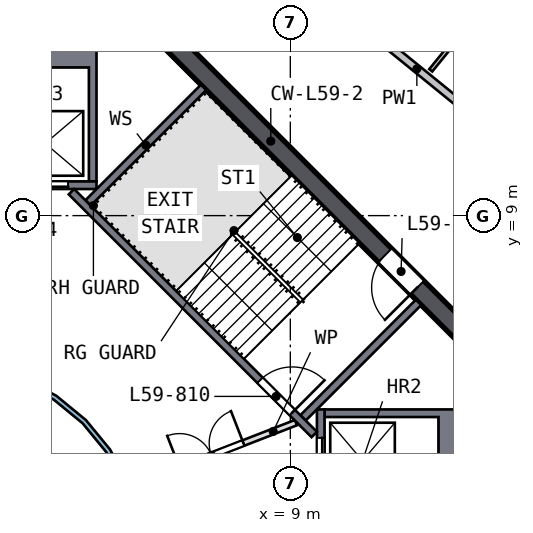
"""IFC4 building model, lengths in metres.
Left out: names, types, materials, properties, quantities, classifications, styles, units other than length and angle.
Written with IfcOpenShell. Run it as: python <this file> out.ifc"""

import sys

from ifc_helpers import new_model, si_unit, direction, frame, frame_2d, origin, place, context, subcontext, project, spatial, polyline, rectangle, outline, extrude, element, fill, save


model = new_model("IFC4")
c1 = context("Model", 3, precision=1e-05, world=origin(), true_north=direction((0.0, 1.0)))
c2 = subcontext(c1, "Body", "Model", "MODEL_VIEW")
j1 = project(units=[si_unit("LENGTHUNIT", "METRE"), si_unit("PLANEANGLEUNIT", "RADIAN")], contexts=[c1])
p1 = place(None, origin())
s1 = spatial("IfcSite", under=j1, at=p1, CompositionType="ELEMENT")
p2 = place(p1, origin())
s2 = spatial("IfcBuilding", under=s1, at=p2, CompositionType="ELEMENT")
p3 = place(p2, frame((0.0, 0.0, 241.0)))
s3 = spatial("IfcBuildingStorey", under=s2, at=p3, CompositionType="ELEMENT", Elevation=241.0)
p4 = place(p3, frame((13.823, 5.622, 0.0), z_axis=(0.0, 0.0, 1.0), x_axis=(-0.707106781, 0.707106781, 0.0)))
e1 = element("IfcWall", 1, at=p4, inside=s3, PredefinedType="SHEAR", context=c2, shape_type="SweptSolid", body=[
    extrude(rectangle(XDim=11.598, YDim=0.5, at=frame_2d((5.799, 0.0))), origin(), (0.0, 0.0, 1.0), 3.5),
])
p5 = place(p4, frame((2.099, 0.0, 0.0)))
e2 = element("IfcOpeningElement", 2, at=p5, cuts=e1, PredefinedType="OPENING", context=c2, shape_type="SweptSolid", body=[
    extrude(rectangle(XDim=1.2, YDim=2.1, at=frame_2d((0.6, 1.05))), frame((0.0, 0.26, 0.0), z_axis=(0.0, -1.0, 0.0), x_axis=(1.0, 0.0, 0.0)), (0.0, 0.0, 1.0), 0.52),
])
p6 = place(p3, origin())
e3 = element("IfcWall", 3, at=p6, inside=s3, PredefinedType="SOLIDWALL", context=c2, shape_type="SweptSolid", body=[
    extrude(outline(polyline([(13.5, 3.9), (13.5, 1.2), (9.9, 1.2), (9.9, 1.4), (12.9, 1.4), (12.9, 3.7), (9.9, 3.7), (9.9, 3.9), (13.5, 3.9)])), origin(), (0.0, 0.0, 1.0), 3.19),
])
p7 = place(p3, frame((9.8, 1.2, 0.0), z_axis=(0.0, 0.0, 1.0), x_axis=(0.0, 1.0, 0.0)))
e4 = element("IfcWall", 4, at=p7, inside=s3, PredefinedType="SOLIDWALL", context=c2, shape_type="SweptSolid", body=[
    extrude(rectangle(XDim=2.7, YDim=0.2, at=frame_2d((1.35, 0.0))), origin(), (0.0, 0.0, 1.0), 3.19),
])
p8 = place(p7, frame((0.75, 0.0, 0.0)))
e5 = element("IfcOpeningElement", 5, at=p8, cuts=e4, PredefinedType="OPENING", context=c2, shape_type="SweptSolid", body=[
    extrude(rectangle(XDim=1.2, YDim=2.1, at=frame_2d((0.6, 1.05))), frame((0.0, 0.11, 0.0), z_axis=(0.0, -1.0, 0.0), x_axis=(1.0, 0.0, 0.0)), (0.0, 0.0, 1.0), 0.22),
])
p9 = place(p3, origin())
e6 = element("IfcWall", 6, at=p9, inside=s3, PredefinedType="SOLIDWALL", context=c2, shape_type="SweptSolid", body=[
    extrude(outline(polyline([(3.9, 9.9), (3.7, 9.9), (3.7, 12.9), (1.4, 12.9), (1.4, 9.9), (1.2, 9.9), (1.2, 13.5), (3.9, 13.5), (3.9, 9.9)])), origin(), (0.0, 0.0, 1.0), 3.19),
])
p10 = place(p3, frame((1.2, 9.8, 0.0), z_axis=(0.0, 0.0, 1.0), x_axis=(1.0, 0.0, 0.0)))
e7 = element("IfcWall", 7, at=p10, inside=s3, PredefinedType="SOLIDWALL", context=c2, shape_type="SweptSolid", body=[
    extrude(rectangle(XDim=2.7, YDim=0.2, at=frame_2d((1.35, 0.0))), origin(), (0.0, 0.0, 1.0), 3.19),
])
p11 = place(p10, frame((0.75, 0.0, 0.0)))
e8 = element("IfcOpeningElement", 8, at=p11, cuts=e7, PredefinedType="OPENING", context=c2, shape_type="SweptSolid", body=[
    extrude(rectangle(XDim=1.2, YDim=2.1, at=frame_2d((0.6, 1.05))), frame((0.0, 0.11, 0.0), z_axis=(0.0, -1.0, 0.0), x_axis=(1.0, 0.0, 0.0)), (0.0, 0.0, 1.0), 0.22),
])
p12 = place(p3, frame((3.24, 9.629, 0.0), z_axis=(0.0, 0.0, 1.0), x_axis=(0.707106781, -0.707106781, 0.0)))
e9 = element("IfcWall", 9, at=p12, inside=s3, PredefinedType="SOLIDWALL", context=c2, shape_type="SweptSolid", body=[
    extrude(rectangle(XDim=9.036, YDim=0.2, at=frame_2d((4.518, 0.0))), origin(), (0.0, 0.0, 1.0), 3.19),
])
p13 = place(p12, frame((7.018, 0.0, 0.0)))
e10 = element("IfcOpeningElement", 10, at=p13, cuts=e9, PredefinedType="OPENING", context=c2, shape_type="SweptSolid", body=[
    extrude(rectangle(XDim=1.2, YDim=2.1, at=frame_2d((0.6, 1.05))), frame((0.0, 0.11, 0.0), z_axis=(0.0, -1.0, 0.0), x_axis=(1.0, 0.0, 0.0)), (0.0, 0.0, 1.0), 0.22),
])
for number, where, z_axis, x_axis in (
    (11, (9.334, 3.677, 0.0), (0.0, 0.0, 1.0), (0.707, 0.707, 0.0)),
    (12, (3.677, 9.334, 0.0), (0.0, 0.0, 1.0), (0.707, 0.707, 0.0)),
):
    element("IfcWall", number, at=place(p3, frame(where, z_axis=z_axis, x_axis=x_axis)), inside=s3, PredefinedType="SOLIDWALL", context=c2, shape_type="SweptSolid", body=[
        extrude(rectangle(XDim=4.3, YDim=0.2, at=frame_2d((2.15, 0.0))), origin(), (0.0, 0.0, 1.0), 3.19),
    ])
p14 = place(p3, frame((4.782, 1.857, 0.0), z_axis=(0.0, 0.0, 1.0), x_axis=(0.932155279, 0.362058746, 0.0)))
e13 = element("IfcWall", 13, at=p14, inside=s3, PredefinedType="PARTITIONING", context=c2, shape_type="SweptSolid", body=[
    extrude(rectangle(XDim=4.682, YDim=0.15, at=frame_2d((2.341, 0.0))), origin(), (0.0, 0.0, 1.0), 3.19),
])
p15 = place(p14, frame((1.4, 0.0, 0.0)))
e14 = element("IfcOpeningElement", 14, at=p15, cuts=e13, PredefinedType="OPENING", context=c2, shape_type="SweptSolid", body=[
    extrude(rectangle(XDim=1.8, YDim=2.1, at=frame_2d((0.9, 1.05))), frame((0.0, 0.085, 0.0), z_axis=(0.0, -1.0, 0.0), x_axis=(1.0, 0.0, 0.0)), (0.0, 0.0, 1.0), 0.17),
])
p16 = place(p3, origin())
e15 = element("IfcWall", 15, at=p16, inside=s3, PredefinedType="SOLIDWALL", context=c2, shape_type="SweptSolid", body=[
    extrude(outline(polyline([(5.021, -0.999), (4.73, -1.959), (4.257, -2.844), (3.62, -3.62), (2.844, -4.257), (1.959, -4.73), (0.999, -5.021), (0.0, -5.12), (-0.999, -5.021), (-1.959, -4.73), (-2.844, -4.257), (-3.62, -3.62), (-4.257, -2.844), (-4.73, -1.959), (-5.021, -0.999), (-5.12, 0.0), (-5.021, 0.999), (-4.73, 1.959), (-4.257, 2.844), (-3.62, 3.62), (-2.844, 4.257), (-1.959, 4.73), (-0.999, 5.021), (0.0, 5.12), (0.999, 5.021), (1.959, 4.73), (2.844, 4.257), (3.62, 3.62), (4.257, 2.844), (4.73, 1.959), (5.021, 0.999), (5.12, 0.0), (5.021, -0.999)]), holes=[polyline([(4.904, 0.976), (4.619, 1.913), (4.157, 2.778), (3.535, 3.535), (2.778, 4.157), (1.913, 4.619), (0.976, 4.904), (0.0, 5.0), (-0.976, 4.904), (-1.913, 4.619), (-2.778, 4.157), (-3.535, 3.535), (-4.157, 2.778), (-4.619, 1.913), (-4.904, 0.976), (-5.0, 0.0), (-4.904, -0.976), (-4.619, -1.913), (-4.157, -2.778), (-3.535, -3.535), (-2.778, -4.157), (-1.913, -4.619), (-0.976, -4.904), (0.0, -5.0), (0.976, -4.904), (1.913, -4.619), (2.778, -4.157), (3.535, -3.535), (4.157, -2.778), (4.619, -1.913), (4.904, -0.976), (5.0, 0.0), (4.904, 0.976)])]), origin(), (0.0, 0.0, 1.0), 3.19),
])
p17 = place(p3, frame((7.513, 16.78, 0.0), z_axis=(0.0, 0.0, 1.0), x_axis=(0.775830166, -0.630941799, 0.0)))
e16 = element("IfcWall", 16, at=p17, inside=s3, PredefinedType="SOLIDWALL", context=c2, shape_type="SweptSolid", body=[
    extrude(rectangle(XDim=9.316, YDim=0.2, at=frame_2d((4.658, 0.0))), origin(), (0.0, 0.0, 1.0), 3.19),
])
p18 = place(p17, frame((1.9, 0.0, 0.0)))
e17 = element("IfcOpeningElement", 17, at=p18, cuts=e16, PredefinedType="OPENING", context=c2, shape_type="SweptSolid", body=[
    extrude(rectangle(XDim=1.0, YDim=2.1, at=frame_2d((0.5, 1.05))), frame((0.0, 0.11, 0.0), z_axis=(0.0, -1.0, 0.0), x_axis=(1.0, 0.0, 0.0)), (0.0, 0.0, 1.0), 0.22),
])
p19 = place(p3, frame((14.651, 15.228, 0.0), z_axis=(0.0, 0.0, 1.0), x_axis=(-0.630936464, -0.775834504, 0.0)))
e18 = element("IfcWall", 18, at=p19, inside=s3, PredefinedType="PARTITIONING", context=c2, shape_type="SweptSolid", body=[
    extrude(rectangle(XDim=3.1, YDim=0.1, at=frame_2d((1.55, 0.0))), origin(), (0.0, 0.0, 1.0), 3.19),
])
p20 = place(p19, frame((1.15, 0.0, 0.0)))
e19 = element("IfcOpeningElement", 19, at=p20, cuts=e18, PredefinedType="OPENING", context=c2, shape_type="SweptSolid", body=[
    extrude(rectangle(XDim=0.9, YDim=2.1, at=frame_2d((0.45, 1.05))), frame((0.0, 0.06, 0.0), z_axis=(0.0, -1.0, 0.0), x_axis=(1.0, 0.0, 0.0)), (0.0, 0.0, 1.0), 0.12),
])
p21 = place(p8, origin())
e20 = element("IfcDoor", 20, at=p21, inside=s3, OperationType="DOUBLE_DOOR_SLIDING", PredefinedType="DOOR", context=c2, shape_type="SweptSolid", body=[
    extrude(rectangle(XDim=1.2, YDim=2.1, at=frame_2d((0.6, 1.05))), frame((0.0, 0.025, 0.0), z_axis=(0.0, -1.0, 0.0), x_axis=(1.0, 0.0, 0.0)), (0.0, 0.0, 1.0), 0.05),
])
fill(e5, e20)
p22 = place(p11, origin())
e21 = element("IfcDoor", 21, at=p22, inside=s3, OperationType="DOUBLE_DOOR_SLIDING", PredefinedType="DOOR", context=c2, shape_type="SweptSolid", body=[
    extrude(rectangle(XDim=1.2, YDim=2.1, at=frame_2d((0.6, 1.05))), frame((0.0, 0.025, 0.0), z_axis=(0.0, -1.0, 0.0), x_axis=(1.0, 0.0, 0.0)), (0.0, 0.0, 1.0), 0.05),
])
fill(e8, e21)
p23 = place(p13, origin())
e22 = element("IfcDoor", 22, at=p23, inside=s3, OperationType="SINGLE_SWING_RIGHT", PredefinedType="DOOR", context=c2, shape_type="SweptSolid", body=[
    extrude(rectangle(XDim=1.2, YDim=2.1, at=frame_2d((0.6, 1.05))), frame((0.0, 0.025, 0.0), z_axis=(0.0, -1.0, 0.0), x_axis=(1.0, 0.0, 0.0)), (0.0, 0.0, 1.0), 0.05),
])
fill(e10, e22)
p24 = place(p5, origin())
e23 = element("IfcDoor", 23, at=p24, inside=s3, OperationType="SINGLE_SWING_LEFT", PredefinedType="DOOR", context=c2, shape_type="SweptSolid", body=[
    extrude(rectangle(XDim=1.2, YDim=2.1, at=frame_2d((0.6, 1.05))), frame((0.0, 0.025, 0.0), z_axis=(0.0, -1.0, 0.0), x_axis=(1.0, 0.0, 0.0)), (0.0, 0.0, 1.0), 0.05),
])
fill(e2, e23)
p25 = place(p15, origin())
e24 = element("IfcDoor", 24, at=p25, inside=s3, OperationType="DOUBLE_DOOR_SINGLE_SWING", PredefinedType="DOOR", context=c2, shape_type="SweptSolid", body=[
    extrude(rectangle(XDim=1.8, YDim=2.1, at=frame_2d((0.9, 1.05))), frame((0.0, 0.025, 0.0), z_axis=(0.0, -1.0, 0.0), x_axis=(1.0, 0.0, 0.0)), (0.0, 0.0, 1.0), 0.05),
])
fill(e14, e24)
save(model, sys.argv[1])
